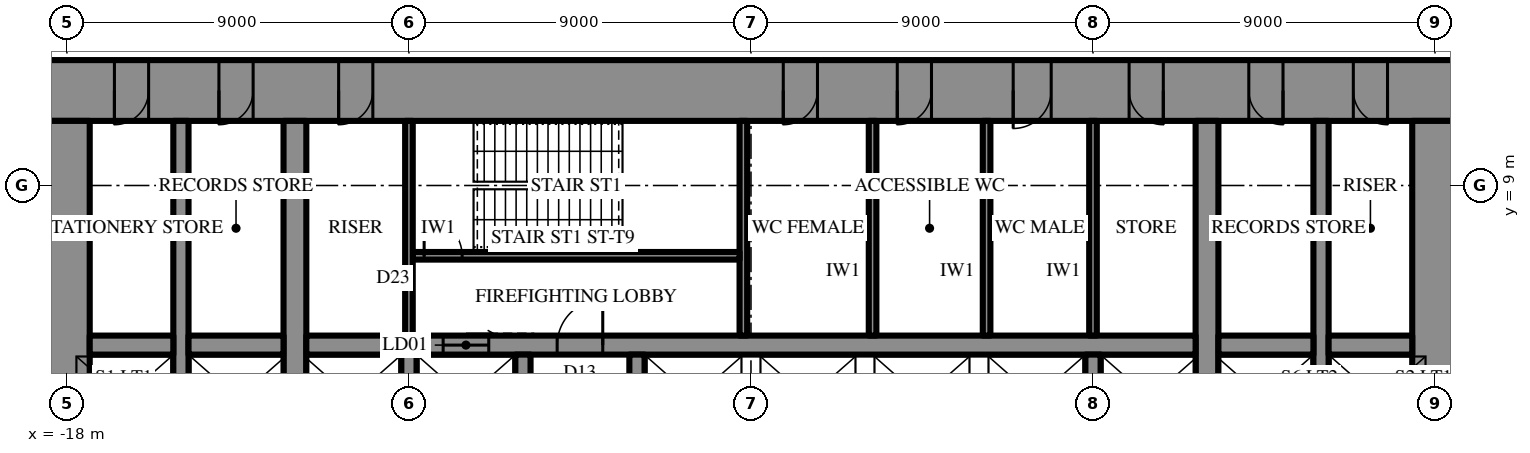
"""IFC4 building model, lengths in metres.
Left out: names, types, materials, properties, quantities, classifications, styles, units other than length and angle.
Written with IfcOpenShell. Run it as: python <this file> out.ifc"""

import sys

from ifc_helpers import new_model, si_unit, direction, frame, frame_2d, origin, place, context, subcontext, project, spatial, rectangle, extrude, element, fill, save


model = new_model("IFC4")
c1 = context("Model", 3, precision=1e-05, world=origin(), true_north=direction((0.0, 1.0)))
c2 = subcontext(c1, "Body", "Model", "MODEL_VIEW")
j1 = project(units=[si_unit("LENGTHUNIT", "METRE"), si_unit("PLANEANGLEUNIT", "RADIAN")], contexts=[c1])
p1 = place(None, origin())
s1 = spatial("IfcSite", under=j1, at=p1, CompositionType="ELEMENT")
p2 = place(p1, origin())
s2 = spatial("IfcBuilding", under=s1, at=p2, CompositionType="ELEMENT")
p3 = place(p2, frame((0.0, 0.0, 114.5)))
s3 = spatial("IfcBuildingStorey", under=s2, at=p3, CompositionType="ELEMENT", Elevation=114.5)
p4 = place(p3, frame((-18.6, 11.5, 0.0), z_axis=(0.0, 0.0, 1.0), x_axis=(1.0, 0.0, 0.0)))
e1 = element("IfcWall", 1, at=p4, inside=s3, PredefinedType="SHEAR", context=c2, shape_type="SweptSolid", body=[
    extrude(rectangle(XDim=37.2, YDim=1.6, at=frame_2d((18.6, 0.0))), origin(), (0.0, 0.0, 1.0), 5.0),
])
p5 = place(p4, frame((19.45, 0.0, 0.0)))
e2 = element("IfcOpeningElement", 2, at=p5, cuts=e1, PredefinedType="OPENING", context=c2, shape_type="SweptSolid", body=[
    extrude(rectangle(XDim=0.9, YDim=2.2, at=frame_2d((0.45, 1.1))), frame((0.0, 0.81, 0.0), z_axis=(0.0, -1.0, 0.0), x_axis=(1.0, 0.0, 0.0)), (0.0, 0.0, 1.0), 1.62),
])
p6 = place(p4, frame((22.45, 0.0, 0.0)))
e3 = element("IfcOpeningElement", 3, at=p6, cuts=e1, PredefinedType="OPENING", context=c2, shape_type="SweptSolid", body=[
    extrude(rectangle(XDim=0.9, YDim=2.2, at=frame_2d((0.45, 1.1))), frame((0.0, 0.81, 0.0), z_axis=(0.0, -1.0, 0.0), x_axis=(1.0, 0.0, 0.0)), (0.0, 0.0, 1.0), 1.62),
])
p7 = place(p4, frame((25.5, 0.0, 0.0)))
e4 = element("IfcOpeningElement", 4, at=p7, cuts=e1, PredefinedType="OPENING", context=c2, shape_type="SweptSolid", body=[
    extrude(rectangle(XDim=1.0, YDim=2.2, at=frame_2d((0.5, 1.1))), frame((0.0, 0.81, 0.0), z_axis=(0.0, -1.0, 0.0), x_axis=(1.0, 0.0, 0.0)), (0.0, 0.0, 1.0), 1.62),
])
p8 = place(p4, frame((1.85, 0.0, 0.0)))
e5 = element("IfcOpeningElement", 5, at=p8, cuts=e1, PredefinedType="OPENING", context=c2, shape_type="SweptSolid", body=[
    extrude(rectangle(XDim=0.9, YDim=2.2, at=frame_2d((0.45, 1.1))), frame((0.0, 0.81, 0.0), z_axis=(0.0, -1.0, 0.0), x_axis=(1.0, 0.0, 0.0)), (0.0, 0.0, 1.0), 1.62),
])
p9 = place(p4, frame((4.6, 0.0, 0.0)))
e6 = element("IfcOpeningElement", 6, at=p9, cuts=e1, PredefinedType="OPENING", context=c2, shape_type="SweptSolid", body=[
    extrude(rectangle(XDim=0.9, YDim=2.2, at=frame_2d((0.45, 1.1))), frame((0.0, 0.81, 0.0), z_axis=(0.0, -1.0, 0.0), x_axis=(1.0, 0.0, 0.0)), (0.0, 0.0, 1.0), 1.62),
])
p10 = place(p4, frame((7.75, 0.0, 0.0)))
e7 = element("IfcOpeningElement", 7, at=p10, cuts=e1, PredefinedType="OPENING", context=c2, shape_type="SweptSolid", body=[
    extrude(rectangle(XDim=0.9, YDim=2.2, at=frame_2d((0.45, 1.1))), frame((0.0, 0.81, 0.0), z_axis=(0.0, -1.0, 0.0), x_axis=(1.0, 0.0, 0.0)), (0.0, 0.0, 1.0), 1.62),
])
p11 = place(p4, frame((28.55, 0.0, 0.0)))
e8 = element("IfcOpeningElement", 8, at=p11, cuts=e1, PredefinedType="OPENING", context=c2, shape_type="SweptSolid", body=[
    extrude(rectangle(XDim=0.9, YDim=2.2, at=frame_2d((0.45, 1.1))), frame((0.0, 0.81, 0.0), z_axis=(0.0, -1.0, 0.0), x_axis=(1.0, 0.0, 0.0)), (0.0, 0.0, 1.0), 1.62),
])
p12 = place(p4, frame((31.7, 0.0, 0.0)))
e9 = element("IfcOpeningElement", 9, at=p12, cuts=e1, PredefinedType="OPENING", context=c2, shape_type="SweptSolid", body=[
    extrude(rectangle(XDim=0.9, YDim=2.2, at=frame_2d((0.45, 1.1))), frame((0.0, 0.81, 0.0), z_axis=(0.0, -1.0, 0.0), x_axis=(1.0, 0.0, 0.0)), (0.0, 0.0, 1.0), 1.62),
])
p13 = place(p4, frame((34.45, 0.0, 0.0)))
e10 = element("IfcOpeningElement", 10, at=p13, cuts=e1, PredefinedType="OPENING", context=c2, shape_type="SweptSolid", body=[
    extrude(rectangle(XDim=0.9, YDim=2.2, at=frame_2d((0.45, 1.1))), frame((0.0, 0.81, 0.0), z_axis=(0.0, -1.0, 0.0), x_axis=(1.0, 0.0, 0.0)), (0.0, 0.0, 1.0), 1.62),
])
p14 = place(p3, frame((18.0, -10.7, 0.0), z_axis=(0.0, 0.0, 1.0), x_axis=(0.0, 1.0, 0.0)))
e11 = element("IfcWall", 11, at=p14, inside=s3, PredefinedType="SHEAR", context=c2, shape_type="SweptSolid", body=[
    extrude(rectangle(XDim=21.4, YDim=1.2, at=frame_2d((10.7, 0.0))), origin(), (0.0, 0.0, 1.0), 5.0),
])
p15 = place(p14, frame((9.8, 0.0, 0.0)))
e12 = element("IfcOpeningElement", 12, at=p15, cuts=e11, PredefinedType="OPENING", context=c2, shape_type="SweptSolid", body=[
    extrude(rectangle(XDim=1.8, YDim=2.4, at=frame_2d((0.9, 1.2))), frame((0.0, 0.61, 0.0), z_axis=(0.0, -1.0, 0.0), x_axis=(1.0, 0.0, 0.0)), (0.0, 0.0, 1.0), 1.22),
])
p16 = place(p3, frame((-18.0, 10.7, 0.0), z_axis=(0.0, 0.0, 1.0), x_axis=(0.0, -1.0, 0.0)))
e13 = element("IfcWall", 13, at=p16, inside=s3, PredefinedType="SHEAR", context=c2, shape_type="SweptSolid", body=[
    extrude(rectangle(XDim=21.4, YDim=1.2, at=frame_2d((10.7, 0.0))), origin(), (0.0, 0.0, 1.0), 5.0),
])
p17 = place(p16, frame((9.8, 0.0, 0.0)))
e14 = element("IfcOpeningElement", 14, at=p17, cuts=e13, PredefinedType="OPENING", context=c2, shape_type="SweptSolid", body=[
    extrude(rectangle(XDim=1.8, YDim=2.4, at=frame_2d((0.9, 1.2))), frame((0.0, 0.61, 0.0), z_axis=(0.0, -1.0, 0.0), x_axis=(1.0, 0.0, 0.0)), (0.0, 0.0, 1.0), 1.22),
])
p18 = place(p3, frame((12.0, -10.7, 0.0), z_axis=(0.0, 0.0, 1.0), x_axis=(0.0, 1.0, 0.0)))
e15 = element("IfcWall", 15, at=p18, inside=s3, PredefinedType="SHEAR", context=c2, shape_type="SweptSolid", body=[
    extrude(rectangle(XDim=21.4, YDim=0.6, at=frame_2d((10.7, 0.0))), origin(), (0.0, 0.0, 1.0), 5.0),
])
p19 = place(p18, frame((9.8, 0.0, 0.0)))
e16 = element("IfcOpeningElement", 16, at=p19, cuts=e15, PredefinedType="OPENING", context=c2, shape_type="SweptSolid", body=[
    extrude(rectangle(XDim=1.8, YDim=2.4, at=frame_2d((0.9, 1.2))), frame((0.0, 0.31, 0.0), z_axis=(0.0, -1.0, 0.0), x_axis=(1.0, 0.0, 0.0)), (0.0, 0.0, 1.0), 0.62),
])
p20 = place(p3, frame((-12.0, -10.7, 0.0), z_axis=(0.0, 0.0, 1.0), x_axis=(0.0, 1.0, 0.0)))
e17 = element("IfcWall", 17, at=p20, inside=s3, PredefinedType="SHEAR", context=c2, shape_type="SweptSolid", body=[
    extrude(rectangle(XDim=21.4, YDim=0.6, at=frame_2d((10.7, 0.0))), origin(), (0.0, 0.0, 1.0), 5.0),
])
p21 = place(p20, frame((9.8, 0.0, 0.0)))
e18 = element("IfcOpeningElement", 18, at=p21, cuts=e17, PredefinedType="OPENING", context=c2, shape_type="SweptSolid", body=[
    extrude(rectangle(XDim=1.8, YDim=2.4, at=frame_2d((0.9, 1.2))), frame((0.0, 0.31, 0.0), z_axis=(0.0, -1.0, 0.0), x_axis=(1.0, 0.0, 0.0)), (0.0, 0.0, 1.0), 0.62),
])
p22 = place(p3, frame((15.0, -10.7, 0.0), z_axis=(0.0, 0.0, 1.0), x_axis=(0.0, 1.0, 0.0)))
e19 = element("IfcWall", 19, at=p22, inside=s3, PredefinedType="SHEAR", context=c2, shape_type="SweptSolid", body=[
    extrude(rectangle(XDim=21.4, YDim=0.4, at=frame_2d((10.7, 0.0))), origin(), (0.0, 0.0, 1.0), 5.0),
])
p23 = place(p22, frame((9.8, 0.0, 0.0)))
e20 = element("IfcOpeningElement", 20, at=p23, cuts=e19, PredefinedType="OPENING", context=c2, shape_type="SweptSolid", body=[
    extrude(rectangle(XDim=1.8, YDim=2.4, at=frame_2d((0.9, 1.2))), frame((0.0, 0.21, 0.0), z_axis=(0.0, -1.0, 0.0), x_axis=(1.0, 0.0, 0.0)), (0.0, 0.0, 1.0), 0.42),
])
p24 = place(p3, frame((-15.0, -10.7, 0.0), z_axis=(0.0, 0.0, 1.0), x_axis=(0.0, 1.0, 0.0)))
e21 = element("IfcWall", 21, at=p24, inside=s3, PredefinedType="SHEAR", context=c2, shape_type="SweptSolid", body=[
    extrude(rectangle(XDim=21.4, YDim=0.4, at=frame_2d((10.7, 0.0))), origin(), (0.0, 0.0, 1.0), 5.0),
])
p25 = place(p24, frame((9.8, 0.0, 0.0)))
e22 = element("IfcOpeningElement", 22, at=p25, cuts=e21, PredefinedType="OPENING", context=c2, shape_type="SweptSolid", body=[
    extrude(rectangle(XDim=1.8, YDim=2.4, at=frame_2d((0.9, 1.2))), frame((0.0, 0.21, 0.0), z_axis=(0.0, -1.0, 0.0), x_axis=(1.0, 0.0, 0.0)), (0.0, 0.0, 1.0), 0.42),
])
p26 = place(p3, frame((-17.4, 4.8, 0.0), z_axis=(0.0, 0.0, 1.0), x_axis=(1.0, 0.0, 0.0)))
e23 = element("IfcWall", 23, at=p26, inside=s3, PredefinedType="SHEAR", context=c2, shape_type="SweptSolid", body=[
    extrude(rectangle(XDim=2.2, YDim=0.5, at=frame_2d((1.1, 0.0))), origin(), (0.0, 0.0, 1.0), 5.0),
])
p27 = place(p3, frame((-14.8, 4.8, 0.0), z_axis=(0.0, 0.0, 1.0), x_axis=(1.0, 0.0, 0.0)))
e24 = element("IfcWall", 24, at=p27, inside=s3, PredefinedType="SHEAR", context=c2, shape_type="SweptSolid", body=[
    extrude(rectangle(XDim=2.5, YDim=0.5, at=frame_2d((1.25, 0.0))), origin(), (0.0, 0.0, 1.0), 5.0),
])
p28 = place(p3, frame((-11.7, 4.8, 0.0), z_axis=(0.0, 0.0, 1.0), x_axis=(1.0, 0.0, 0.0)))
e25 = element("IfcWall", 25, at=p28, inside=s3, PredefinedType="SHEAR", context=c2, shape_type="SweptSolid", body=[
    extrude(rectangle(XDim=23.4, YDim=0.5, at=frame_2d((11.7, 0.0))), origin(), (0.0, 0.0, 1.0), 5.0),
])
p29 = place(p28, frame((6.6, 0.0, 0.0)))
e26 = element("IfcOpeningElement", 26, at=p29, cuts=e25, PredefinedType="OPENING", context=c2, shape_type="SweptSolid", body=[
    extrude(rectangle(XDim=1.2, YDim=2.2, at=frame_2d((0.6, 1.1))), frame((0.0, 0.26, 0.0), z_axis=(0.0, -1.0, 0.0), x_axis=(1.0, 0.0, 0.0)), (0.0, 0.0, 1.0), 0.52),
])
p30 = place(p28, frame((3.6, 0.0, 0.0)))
e27 = element("IfcOpeningElement", 27, at=p30, cuts=e25, PredefinedType="OPENING", context=c2, shape_type="SweptSolid", body=[
    extrude(rectangle(XDim=1.2, YDim=2.2, at=frame_2d((0.6, 1.1))), frame((0.0, 0.26, 0.0), z_axis=(0.0, -1.0, 0.0), x_axis=(1.0, 0.0, 0.0)), (0.0, 0.0, 1.0), 0.52),
])
p31 = place(p3, frame((12.3, 4.8, 0.0), z_axis=(0.0, 0.0, 1.0), x_axis=(1.0, 0.0, 0.0)))
e28 = element("IfcWall", 28, at=p31, inside=s3, PredefinedType="SHEAR", context=c2, shape_type="SweptSolid", body=[
    extrude(rectangle(XDim=2.5, YDim=0.5, at=frame_2d((1.25, 0.0))), origin(), (0.0, 0.0, 1.0), 5.0),
])
p32 = place(p3, frame((15.2, 4.8, 0.0), z_axis=(0.0, 0.0, 1.0), x_axis=(1.0, 0.0, 0.0)))
e29 = element("IfcWall", 29, at=p32, inside=s3, PredefinedType="SHEAR", context=c2, shape_type="SweptSolid", body=[
    extrude(rectangle(XDim=2.2, YDim=0.5, at=frame_2d((1.1, 0.0))), origin(), (0.0, 0.0, 1.0), 5.0),
])
for number, where, z_axis, x_axis in (
    (30, (-9.0, 2.25, 0.0), (0.0, 0.0, 1.0), (0.0, 1.0, 0.0)),
    (31, (-6.0, 2.25, 0.0), (0.0, 0.0, 1.0), (0.0, 1.0, 0.0)),
    (32, (-3.0, 2.25, 0.0), (0.0, 0.0, 1.0), (0.0, 1.0, 0.0)),
    (33, (9.0, 2.25, 0.0), (0.0, 0.0, 1.0), (0.0, 1.0, 0.0)),
):
    element("IfcWall", number, at=place(p3, frame(where, z_axis=z_axis, x_axis=x_axis)), inside=s3, PredefinedType="SHEAR", context=c2, shape_type="SweptSolid", body=[
        extrude(rectangle(XDim=2.3, YDim=0.4, at=frame_2d((1.15, 0.0))), origin(), (0.0, 0.0, 1.0), 5.0),
    ])
p33 = place(p3, frame((-0.2, 5.05, 0.0), z_axis=(0.0, 0.0, 1.0), x_axis=(0.0, 1.0, 0.0)))
e34 = element("IfcWall", 34, at=p33, inside=s3, PredefinedType="SHEAR", context=c2, shape_type="SweptSolid", body=[
    extrude(rectangle(XDim=5.65, YDim=0.2, at=frame_2d((2.825, 0.0))), origin(), (0.0, 0.0, 1.0), 5.0),
])
p34 = place(p3, frame((-8.9, 7.15, 0.0), z_axis=(0.0, 0.0, 1.0), x_axis=(1.0, 0.0, 0.0)))
e35 = element("IfcWall", 35, at=p34, inside=s3, PredefinedType="SHEAR", context=c2, shape_type="SweptSolid", body=[
    extrude(rectangle(XDim=8.6, YDim=0.2, at=frame_2d((4.3, 0.0))), origin(), (0.0, 0.0, 1.0), 5.0),
])
p35 = place(p34, frame((0.3, 0.0, 0.0)))
e36 = element("IfcOpeningElement", 36, at=p35, cuts=e35, PredefinedType="OPENING", context=c2, shape_type="SweptSolid", body=[
    extrude(rectangle(XDim=1.0, YDim=2.2, at=frame_2d((0.5, 1.1))), frame((0.0, 0.11, 0.0), z_axis=(0.0, -1.0, 0.0), x_axis=(1.0, 0.0, 0.0)), (0.0, 0.0, 1.0), 0.22),
])
for number, where, z_axis, x_axis in (
    (37, (-9.0, 5.05, 0.0), (0.0, 0.0, 1.0), (0.0, 1.0, 0.0)),
    (38, (9.0, 5.05, 0.0), (0.0, 0.0, 1.0), (0.0, 1.0, 0.0)),
    (39, (3.2, 5.05, 0.0), (0.0, 0.0, 1.0), (0.0, 1.0, 0.0)),
    (40, (6.2, 5.05, 0.0), (0.0, 0.0, 1.0), (0.0, 1.0, 0.0)),
):
    element("IfcWall", number, at=place(p3, frame(where, z_axis=z_axis, x_axis=x_axis)), inside=s3, PredefinedType="PARTITIONING", context=c2, shape_type="SweptSolid", body=[
        extrude(rectangle(XDim=5.65, YDim=0.2, at=frame_2d((2.825, 0.0))), origin(), (0.0, 0.0, 1.0), 4.8),
    ])
p36 = place(p29, origin())
e41 = element("IfcDoor", 41, at=p36, inside=s3, OperationType="SINGLE_SWING_LEFT", PredefinedType="DOOR", context=c2, shape_type="SweptSolid", body=[
    extrude(rectangle(XDim=1.2, YDim=2.2, at=frame_2d((0.6, 1.1))), frame((0.0, 0.025, 0.0), z_axis=(0.0, -1.0, 0.0), x_axis=(1.0, 0.0, 0.0)), (0.0, 0.0, 1.0), 0.05),
])
fill(e26, e41)
p37 = place(p35, origin())
e42 = element("IfcDoor", 42, at=p37, inside=s3, OperationType="SINGLE_SWING_RIGHT", PredefinedType="DOOR", context=c2, shape_type="SweptSolid", body=[
    extrude(rectangle(XDim=1.0, YDim=2.2, at=frame_2d((0.5, 1.1))), frame((0.0, 0.025, 0.0), z_axis=(0.0, -1.0, 0.0), x_axis=(1.0, 0.0, 0.0)), (0.0, 0.0, 1.0), 0.05),
])
fill(e36, e42)
p38 = place(p5, frame((0.9, 0.0, 0.0), z_axis=(0.0, 0.0, 1.0), x_axis=(-1.0, 0.0, 0.0)))
e43 = element("IfcDoor", 43, at=p38, inside=s3, OperationType="SINGLE_SWING_LEFT", PredefinedType="DOOR", context=c2, shape_type="SweptSolid", body=[
    extrude(rectangle(XDim=0.9, YDim=2.2, at=frame_2d((0.45, 1.1))), frame((0.0, 0.025, 0.0), z_axis=(0.0, -1.0, 0.0), x_axis=(1.0, 0.0, 0.0)), (0.0, 0.0, 1.0), 0.05),
])
fill(e2, e43)
p39 = place(p6, frame((0.9, 0.0, 0.0), z_axis=(0.0, 0.0, 1.0), x_axis=(-1.0, 0.0, 0.0)))
e44 = element("IfcDoor", 44, at=p39, inside=s3, OperationType="SINGLE_SWING_LEFT", PredefinedType="DOOR", context=c2, shape_type="SweptSolid", body=[
    extrude(rectangle(XDim=0.9, YDim=2.2, at=frame_2d((0.45, 1.1))), frame((0.0, 0.025, 0.0), z_axis=(0.0, -1.0, 0.0), x_axis=(1.0, 0.0, 0.0)), (0.0, 0.0, 1.0), 0.05),
])
fill(e3, e44)
p40 = place(p7, frame((1.0, 0.0, 0.0), z_axis=(0.0, 0.0, 1.0), x_axis=(-1.0, 0.0, 0.0)))
e45 = element("IfcDoor", 45, at=p40, inside=s3, OperationType="SINGLE_SWING_LEFT", PredefinedType="DOOR", context=c2, shape_type="SweptSolid", body=[
    extrude(rectangle(XDim=1.0, YDim=2.2, at=frame_2d((0.5, 1.1))), frame((0.0, 0.025, 0.0), z_axis=(0.0, -1.0, 0.0), x_axis=(1.0, 0.0, 0.0)), (0.0, 0.0, 1.0), 0.05),
])
fill(e4, e45)
p41 = place(p8, frame((0.9, 0.0, 0.0), z_axis=(0.0, 0.0, 1.0), x_axis=(-1.0, 0.0, 0.0)))
e46 = element("IfcDoor", 46, at=p41, inside=s3, OperationType="SINGLE_SWING_LEFT", PredefinedType="DOOR", context=c2, shape_type="SweptSolid", body=[
    extrude(rectangle(XDim=0.9, YDim=2.2, at=frame_2d((0.45, 1.1))), frame((0.0, 0.025, 0.0), z_axis=(0.0, -1.0, 0.0), x_axis=(1.0, 0.0, 0.0)), (0.0, 0.0, 1.0), 0.05),
])
fill(e5, e46)
p42 = place(p9, frame((0.9, 0.0, 0.0), z_axis=(0.0, 0.0, 1.0), x_axis=(-1.0, 0.0, 0.0)))
e47 = element("IfcDoor", 47, at=p42, inside=s3, OperationType="SINGLE_SWING_LEFT", PredefinedType="DOOR", context=c2, shape_type="SweptSolid", body=[
    extrude(rectangle(XDim=0.9, YDim=2.2, at=frame_2d((0.45, 1.1))), frame((0.0, 0.025, 0.0), z_axis=(0.0, -1.0, 0.0), x_axis=(1.0, 0.0, 0.0)), (0.0, 0.0, 1.0), 0.05),
])
fill(e6, e47)
p43 = place(p10, frame((0.9, 0.0, 0.0), z_axis=(0.0, 0.0, 1.0), x_axis=(-1.0, 0.0, 0.0)))
e48 = element("IfcDoor", 48, at=p43, inside=s3, OperationType="SINGLE_SWING_LEFT", PredefinedType="DOOR", context=c2, shape_type="SweptSolid", body=[
    extrude(rectangle(XDim=0.9, YDim=2.2, at=frame_2d((0.45, 1.1))), frame((0.0, 0.025, 0.0), z_axis=(0.0, -1.0, 0.0), x_axis=(1.0, 0.0, 0.0)), (0.0, 0.0, 1.0), 0.05),
])
fill(e7, e48)
p44 = place(p11, frame((0.9, 0.0, 0.0), z_axis=(0.0, 0.0, 1.0), x_axis=(-1.0, 0.0, 0.0)))
e49 = element("IfcDoor", 49, at=p44, inside=s3, OperationType="SINGLE_SWING_RIGHT", PredefinedType="DOOR", context=c2, shape_type="SweptSolid", body=[
    extrude(rectangle(XDim=0.9, YDim=2.2, at=frame_2d((0.45, 1.1))), frame((0.0, 0.025, 0.0), z_axis=(0.0, -1.0, 0.0), x_axis=(1.0, 0.0, 0.0)), (0.0, 0.0, 1.0), 0.05),
])
fill(e8, e49)
p45 = place(p12, frame((0.9, 0.0, 0.0), z_axis=(0.0, 0.0, 1.0), x_axis=(-1.0, 0.0, 0.0)))
e50 = element("IfcDoor", 50, at=p45, inside=s3, OperationType="SINGLE_SWING_RIGHT", PredefinedType="DOOR", context=c2, shape_type="SweptSolid", body=[
    extrude(rectangle(XDim=0.9, YDim=2.2, at=frame_2d((0.45, 1.1))), frame((0.0, 0.025, 0.0), z_axis=(0.0, -1.0, 0.0), x_axis=(1.0, 0.0, 0.0)), (0.0, 0.0, 1.0), 0.05),
])
fill(e9, e50)
p46 = place(p13, frame((0.9, 0.0, 0.0), z_axis=(0.0, 0.0, 1.0), x_axis=(-1.0, 0.0, 0.0)))
e51 = element("IfcDoor", 51, at=p46, inside=s3, OperationType="SINGLE_SWING_RIGHT", PredefinedType="DOOR", context=c2, shape_type="SweptSolid", body=[
    extrude(rectangle(XDim=0.9, YDim=2.2, at=frame_2d((0.45, 1.1))), frame((0.0, 0.025, 0.0), z_axis=(0.0, -1.0, 0.0), x_axis=(1.0, 0.0, 0.0)), (0.0, 0.0, 1.0), 0.05),
])
fill(e10, e51)
p47 = place(p30, origin())
e52 = element("IfcDoor", 52, at=p47, inside=s3, OperationType="SLIDING_TO_LEFT", PredefinedType="DOOR", context=c2, shape_type="SweptSolid", body=[
    extrude(rectangle(XDim=1.2, YDim=2.2, at=frame_2d((0.6, 1.1))), frame((0.0, 0.025, 0.0), z_axis=(0.0, -1.0, 0.0), x_axis=(1.0, 0.0, 0.0)), (0.0, 0.0, 1.0), 0.05),
])
fill(e27, e52)
save(model, sys.argv[1])
